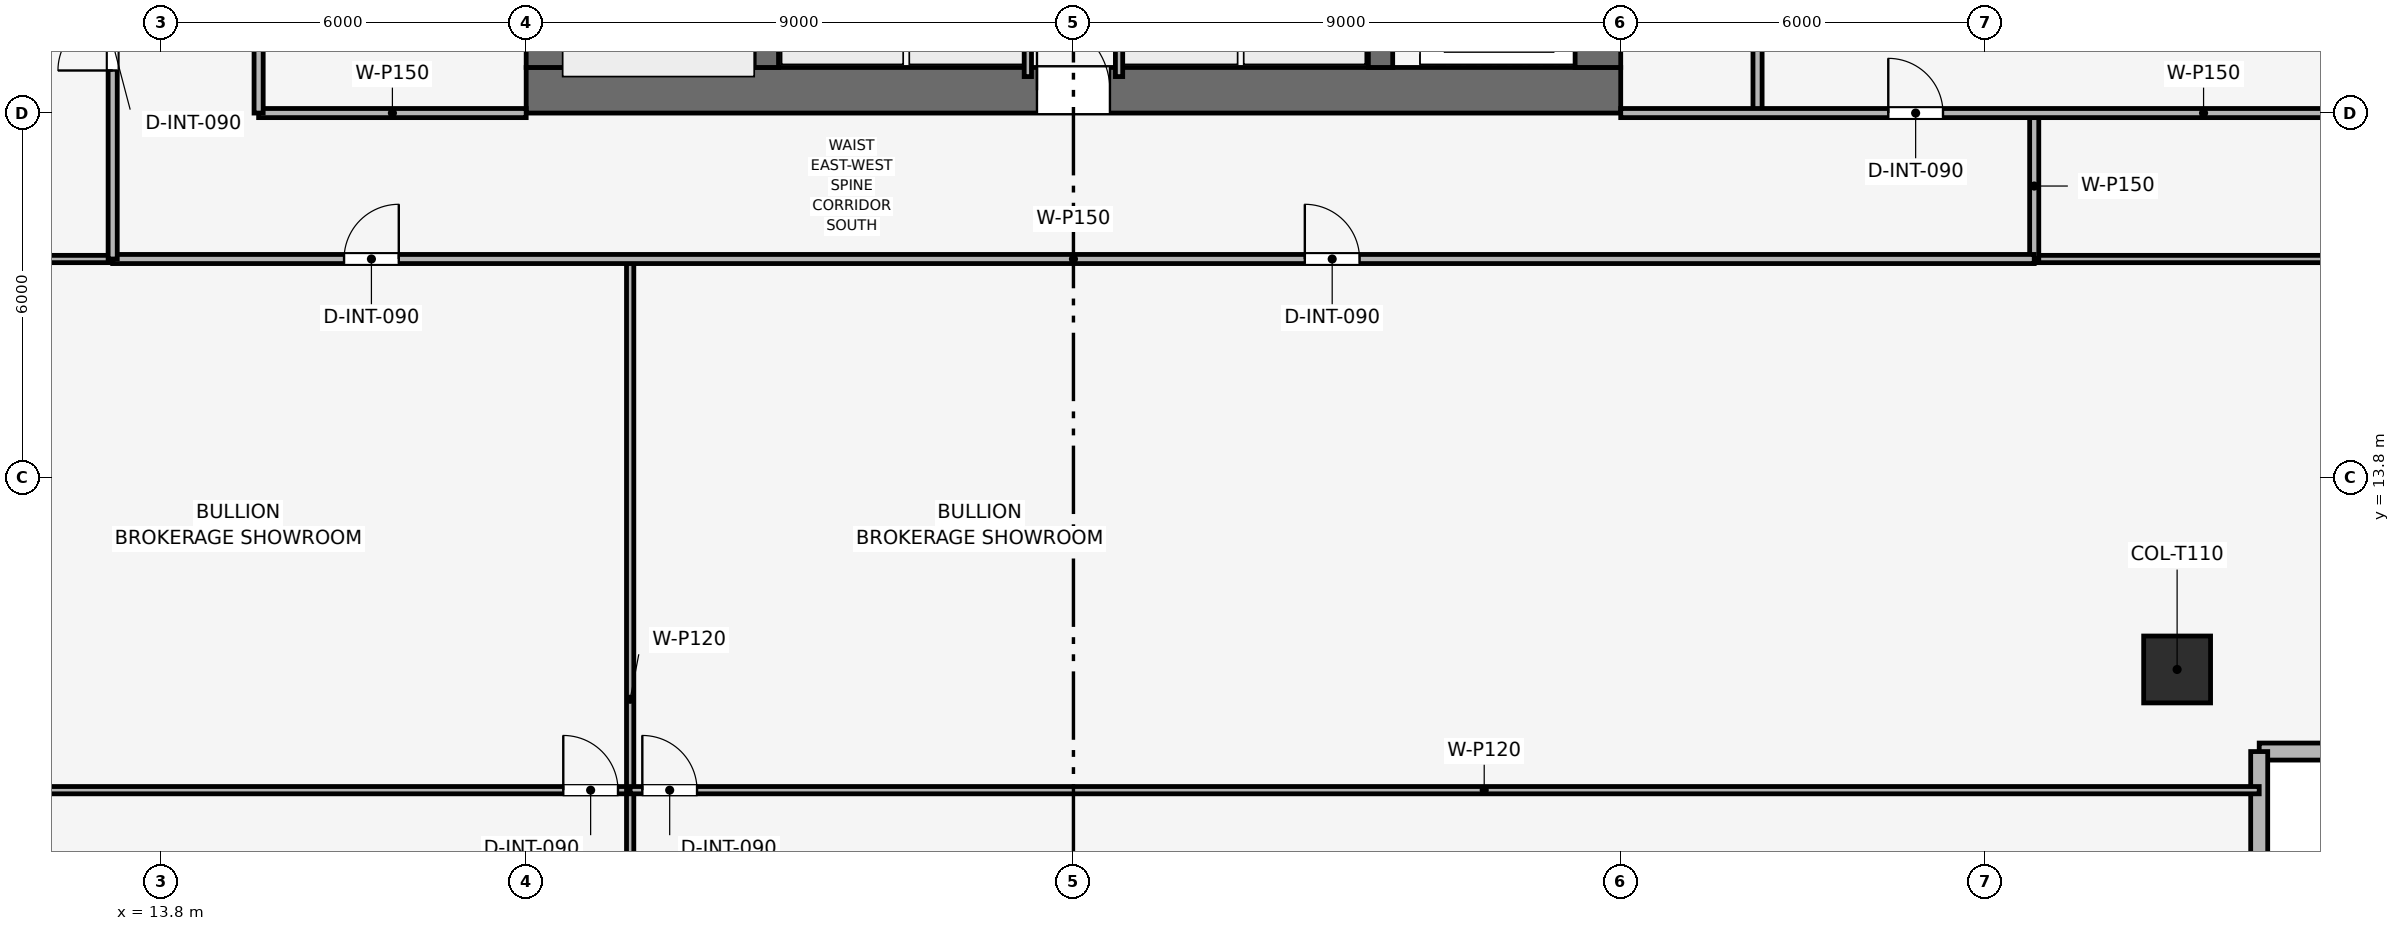
"""IFC4 building model, lengths in metres.
Left out: names, types, materials, properties, quantities, classifications, styles, units other than length and angle.
Written with IfcOpenShell. Run it as: python <this file> out.ifc"""

import sys

from ifc_helpers import new_model, si_unit, direction, frame, frame_2d, origin, origin_2d, place, context, subcontext, project, spatial, rectangle, extrude, element, fill, save


model = new_model("IFC4")
c1 = context("Model", 3, precision=1e-05, world=origin(), true_north=direction((0.0, 1.0)))
c2 = subcontext(c1, "Body", "Model", "MODEL_VIEW")
j1 = project(units=[si_unit("LENGTHUNIT", "METRE"), si_unit("PLANEANGLEUNIT", "RADIAN")], contexts=[c1])
p1 = place(None, origin())
s1 = spatial("IfcSite", under=j1, at=p1, CompositionType="ELEMENT")
p2 = place(p1, origin())
s2 = spatial("IfcBuilding", under=s1, at=p2, CompositionType="ELEMENT")
p3 = place(p2, frame((0.0, 0.0, 214.95)))
s3 = spatial("IfcBuildingStorey", under=s2, at=p3, CompositionType="ELEMENT", Elevation=214.95)
p4 = place(p3, frame((19.8, 20.175, 0.0), z_axis=(0.0, 0.0, 1.0), x_axis=(1.0, 0.0, 0.0)))
e1 = element("IfcWall", 1, at=p4, inside=s3, PredefinedType="SHEAR", context=c2, shape_type="SweptSolid", body=[
    extrude(rectangle(XDim=18.0, YDim=0.75, at=frame_2d((9.0, 0.0))), origin(), (0.0, 0.0, 1.0), 3.75),
])
p5 = place(p4, frame((8.4, 0.0, 0.0)))
e2 = element("IfcOpeningElement", 2, at=p5, cuts=e1, PredefinedType="OPENING", context=c2, shape_type="SweptSolid", body=[
    extrude(rectangle(XDim=1.2, YDim=2.2, at=frame_2d((0.6, 1.1))), frame((0.0, 0.385, 0.0), z_axis=(0.0, -1.0, 0.0), x_axis=(1.0, 0.0, 0.0)), (0.0, 0.0, 1.0), 0.77),
])
p6 = place(p3, frame((20.175, 20.55, 0.0), z_axis=(0.0, 0.0, 1.0), x_axis=(0.0, 1.0, 0.0)))
e3 = element("IfcWall", 3, at=p6, inside=s3, PredefinedType="SHEAR", context=c2, shape_type="SweptSolid", body=[
    extrude(rectangle(XDim=16.5, YDim=0.75, at=frame_2d((8.25, 0.0))), origin(), (0.0, 0.0, 1.0), 3.75),
])
p7 = place(p6, frame((10.25, 0.0, 0.0)))
e4 = element("IfcOpeningElement", 4, at=p7, cuts=e3, PredefinedType="OPENING", context=c2, shape_type="SweptSolid", body=[
    extrude(rectangle(XDim=1.1, YDim=2.15, at=frame_2d((0.55, 1.075))), frame((0.0, 0.385, 0.0), z_axis=(0.0, -1.0, 0.0), x_axis=(1.0, 0.0, 0.0)), (0.0, 0.0, 1.0), 0.77),
])
p8 = place(p3, frame((37.425, 20.55, 0.0), z_axis=(0.0, 0.0, 1.0), x_axis=(0.0, 1.0, 0.0)))
e5 = element("IfcWall", 5, at=p8, inside=s3, PredefinedType="SHEAR", context=c2, shape_type="SweptSolid", body=[
    extrude(rectangle(XDim=16.5, YDim=0.75, at=frame_2d((8.25, 0.0))), origin(), (0.0, 0.0, 1.0), 3.75),
])
p9 = place(p8, frame((4.75, 0.0, 0.0)))
e6 = element("IfcOpeningElement", 6, at=p9, cuts=e5, PredefinedType="OPENING", context=c2, shape_type="SweptSolid", body=[
    extrude(rectangle(XDim=1.1, YDim=2.15, at=frame_2d((0.55, 1.075))), frame((0.0, 0.385, 0.0), z_axis=(0.0, -1.0, 0.0), x_axis=(1.0, 0.0, 0.0)), (0.0, 0.0, 1.0), 0.77),
])
for number, where, z_axis, x_axis in (
    (7, (23.75, 20.55, 0.0), (0.0, 0.0, 1.0), (0.0, 1.0, 0.0)),
    (8, (33.85, 20.55, 0.0), (0.0, 0.0, 1.0), (0.0, 1.0, 0.0)),
):
    element("IfcWall", number, at=place(p3, frame(where, z_axis=z_axis, x_axis=x_axis)), inside=s3, PredefinedType="SHEAR", context=c2, shape_type="SweptSolid", body=[
        extrude(rectangle(XDim=16.5, YDim=0.4, at=frame_2d((8.25, 0.0))), origin(), (0.0, 0.0, 1.0), 3.75),
    ])
p10 = place(p3, frame((46.95, 10.65, 0.003), z_axis=(0.0, 0.0, 1.0), x_axis=(1.0, 0.0, 0.0)))
e9 = element("IfcColumn", 9, at=p10, inside=s3, PredefinedType="COLUMN", context=c2, shape_type="SweptSolid", body=[
    extrude(rectangle(XDim=1.1, YDim=1.1, at=origin_2d()), origin(), (0.0, 0.0, 1.0), 3.494),
])
p11 = place(p3, frame((55.67, 9.3, 0.0), z_axis=(0.0, 0.0, 1.0), x_axis=(-1.0, 0.0, 0.0)))
e10 = element("IfcWall", 10, at=p11, inside=s3, PredefinedType="SOLIDWALL", context=c2, shape_type="SweptSolid", body=[
    extrude(rectangle(XDim=7.37, YDim=0.28, at=frame_2d((3.685, 0.0))), origin(), (0.0, 0.0, 1.0), 3.5),
])
p12 = place(p11, frame((2.435, 0.0, 0.9)))
e11 = element("IfcOpeningElement", 11, at=p12, cuts=e10, PredefinedType="OPENING", context=c2, shape_type="SweptSolid", body=[
    extrude(rectangle(XDim=2.5, YDim=1.9, at=frame_2d((1.25, 0.95))), frame((0.0, 0.15, 0.0), z_axis=(0.0, -1.0, 0.0), x_axis=(1.0, 0.0, 0.0)), (0.0, 0.0, 1.0), 0.3),
])
p13 = place(p3, frame((48.3, 9.3, 0.0), z_axis=(0.0, 0.0, 1.0), x_axis=(0.0, -1.0, 0.0)))
e12 = element("IfcWall", 12, at=p13, inside=s3, PredefinedType="SOLIDWALL", context=c2, shape_type="SweptSolid", body=[
    extrude(rectangle(XDim=7.37, YDim=0.28, at=frame_2d((3.685, 0.0))), origin(), (0.0, 0.0, 1.0), 3.5),
])
p14 = place(p13, frame((2.435, 0.0, 0.9)))
e13 = element("IfcOpeningElement", 13, at=p14, cuts=e12, PredefinedType="OPENING", context=c2, shape_type="SweptSolid", body=[
    extrude(rectangle(XDim=2.5, YDim=1.9, at=frame_2d((1.25, 0.95))), frame((0.0, 0.15, 0.0), z_axis=(0.0, -1.0, 0.0), x_axis=(1.0, 0.0, 0.0)), (0.0, 0.0, 1.0), 0.3),
])
for number, where, z_axis, x_axis in (
    (14, (28.05, 20.4, 0.0), (0.0, 0.0, 1.0), (0.0, 1.0, 0.0)),
    (15, (29.55, 20.4, 0.0), (0.0, 0.0, 1.0), (0.0, 1.0, 0.0)),
):
    element("IfcWall", number, at=place(p3, frame(where, z_axis=z_axis, x_axis=x_axis)), inside=s3, PredefinedType="PARTITIONING", context=c2, shape_type="SweptSolid", body=[
        extrude(rectangle(XDim=2.75, YDim=0.12, at=frame_2d((1.375, 0.0))), origin(), (0.0, 0.0, 1.0), 3.5),
    ])
p15 = place(p3, frame((15.4, 19.8, 0.0), z_axis=(0.0, 0.0, 1.0), x_axis=(1.0, 0.0, 0.0)))
e16 = element("IfcWall", 16, at=p15, inside=s3, PredefinedType="PARTITIONING", context=c2, shape_type="SweptSolid", body=[
    extrude(rectangle(XDim=4.4, YDim=0.15, at=frame_2d((2.2, 0.0))), origin(), (0.0, 0.0, 1.0), 3.035),
])
p16 = place(p3, frame((15.4, 19.8, 0.0), z_axis=(0.0, 0.0, 1.0), x_axis=(0.0, 1.0, 0.0)))
e17 = element("IfcWall", 17, at=p16, inside=s3, PredefinedType="PARTITIONING", context=c2, shape_type="SweptSolid", body=[
    extrude(rectangle(XDim=10.35, YDim=0.15, at=frame_2d((5.175, 0.0))), origin(), (0.0, 0.0, 1.0), 3.035),
])
p17 = place(p16, frame((1.2, 0.0, 0.0)))
e18 = element("IfcOpeningElement", 18, at=p17, cuts=e17, PredefinedType="OPENING", context=c2, shape_type="SweptSolid", body=[
    extrude(rectangle(XDim=0.9, YDim=2.1, at=frame_2d((0.45, 1.05))), frame((0.0, 0.085, 0.0), z_axis=(0.0, -1.0, 0.0), x_axis=(1.0, 0.0, 0.0)), (0.0, 0.0, 1.0), 0.17),
])
p18 = place(p16, frame((4.7, 0.0, 0.0)))
e19 = element("IfcOpeningElement", 19, at=p18, cuts=e17, PredefinedType="OPENING", context=c2, shape_type="SweptSolid", body=[
    extrude(rectangle(XDim=0.9, YDim=2.1, at=frame_2d((0.45, 1.05))), frame((0.0, 0.085, 0.0), z_axis=(0.0, -1.0, 0.0), x_axis=(1.0, 0.0, 0.0)), (0.0, 0.0, 1.0), 0.17),
])
p19 = place(p16, frame((8.1, 0.0, 0.0)))
e20 = element("IfcOpeningElement", 20, at=p19, cuts=e17, PredefinedType="OPENING", context=c2, shape_type="SweptSolid", body=[
    extrude(rectangle(XDim=0.95, YDim=2.1, at=frame_2d((0.475, 1.05))), frame((0.0, 0.085, 0.0), z_axis=(0.0, -1.0, 0.0), x_axis=(1.0, 0.0, 0.0)), (0.0, 0.0, 1.0), 0.17),
])
p20 = place(p3, frame((40.05, 19.8, 0.0), z_axis=(0.0, 0.0, 1.0), x_axis=(0.0, 1.0, 0.0)))
e21 = element("IfcWall", 21, at=p20, inside=s3, PredefinedType="PARTITIONING", context=c2, shape_type="SweptSolid", body=[
    extrude(rectangle(XDim=7.05, YDim=0.15, at=frame_2d((3.525, 0.0))), origin(), (0.0, 0.0, 1.0), 3.035),
])
p21 = place(p3, frame((9.3, 8.665, 0.0), z_axis=(0.0, 0.0, 1.0), x_axis=(1.0, 0.0, 0.0)))
e22 = element("IfcWall", 22, at=p21, inside=s3, PredefinedType="PARTITIONING", context=c2, shape_type="SweptSolid", body=[
    extrude(rectangle(XDim=12.21, YDim=0.12, at=frame_2d((6.105, 0.0))), origin(), (0.0, 0.0, 1.0), 2.885),
])
p22 = place(p21, frame((11.11, 0.0, 0.0)))
e23 = element("IfcOpeningElement", 23, at=p22, cuts=e22, PredefinedType="OPENING", context=c2, shape_type="SweptSolid", body=[
    extrude(rectangle(XDim=0.9, YDim=2.1, at=frame_2d((0.45, 1.05))), frame((0.0, 0.07, 0.0), z_axis=(0.0, -1.0, 0.0), x_axis=(1.0, 0.0, 0.0)), (0.0, 0.0, 1.0), 0.14),
])
p23 = place(p3, frame((21.51, 1.93, 0.0), z_axis=(0.0, 0.0, 1.0), x_axis=(0.0, 1.0, 0.0)))
e24 = element("IfcWall", 24, at=p23, inside=s3, PredefinedType="PARTITIONING", context=c2, shape_type="SweptSolid", body=[
    extrude(rectangle(XDim=15.47, YDim=0.12, at=frame_2d((7.735, 0.0))), origin(), (0.0, 0.0, 1.0), 2.885),
])
p24 = place(p3, frame((21.51, 8.665, 0.0), z_axis=(0.0, 0.0, 1.0), x_axis=(1.0, 0.0, 0.0)))
e25 = element("IfcWall", 25, at=p24, inside=s3, PredefinedType="PARTITIONING", context=c2, shape_type="SweptSolid", body=[
    extrude(rectangle(XDim=26.79, YDim=0.12, at=frame_2d((13.395, 0.0))), origin(), (0.0, 0.0, 1.0), 2.885),
])
p25 = place(p24, frame((0.2, 0.0, 0.0)))
e26 = element("IfcOpeningElement", 26, at=p25, cuts=e25, PredefinedType="OPENING", context=c2, shape_type="SweptSolid", body=[
    extrude(rectangle(XDim=0.9, YDim=2.1, at=frame_2d((0.45, 1.05))), frame((0.0, 0.07, 0.0), z_axis=(0.0, -1.0, 0.0), x_axis=(1.0, 0.0, 0.0)), (0.0, 0.0, 1.0), 0.14),
])
p26 = place(p3, frame((1.93, 17.4, 0.0), z_axis=(0.0, 0.0, 1.0), x_axis=(1.0, 0.0, 0.0)))
e27 = element("IfcWall", 27, at=p26, inside=s3, PredefinedType="PARTITIONING", context=c2, shape_type="SweptSolid", body=[
    extrude(rectangle(XDim=11.07, YDim=0.12, at=frame_2d((5.535, 0.0))), origin(), (0.0, 0.0, 1.0), 2.885),
])
p27 = place(p3, frame((44.6, 17.4, 0.0), z_axis=(0.0, 0.0, 1.0), x_axis=(1.0, 0.0, 0.0)))
e28 = element("IfcWall", 28, at=p27, inside=s3, PredefinedType="PARTITIONING", context=c2, shape_type="SweptSolid", body=[
    extrude(rectangle(XDim=11.07, YDim=0.12, at=frame_2d((5.535, 0.0))), origin(), (0.0, 0.0, 1.0), 2.885),
])
p28 = place(p3, frame((44.6, 17.4, 0.0), z_axis=(0.0, 0.0, 1.0), x_axis=(0.0, 1.0, 0.0)))
e29 = element("IfcWall", 29, at=p28, inside=s3, PredefinedType="PARTITIONING", context=c2, shape_type="SweptSolid", body=[
    extrude(rectangle(XDim=2.4, YDim=0.15, at=frame_2d((1.2, 0.0))), origin(), (0.0, 0.0, 1.0), 3.5),
])
p29 = place(p3, frame((37.8, 19.8, 0.0), z_axis=(0.0, 0.0, 1.0), x_axis=(1.0, 0.0, 0.0)))
e30 = element("IfcWall", 30, at=p29, inside=s3, PredefinedType="PARTITIONING", context=c2, shape_type="SweptSolid", body=[
    extrude(rectangle(XDim=17.87, YDim=0.15, at=frame_2d((8.935, 0.0))), origin(), (0.0, 0.0, 1.0), 2.885),
])
p30 = place(p29, frame((4.4, 0.0, 0.0)))
e31 = element("IfcOpeningElement", 31, at=p30, cuts=e30, PredefinedType="OPENING", context=c2, shape_type="SweptSolid", body=[
    extrude(rectangle(XDim=0.9, YDim=2.1, at=frame_2d((0.45, 1.05))), frame((0.0, 0.085, 0.0), z_axis=(0.0, -1.0, 0.0), x_axis=(1.0, 0.0, 0.0)), (0.0, 0.0, 1.0), 0.17),
])
p31 = place(p3, frame((13.0, 17.4, 0.0), z_axis=(0.0, 0.0, 1.0), x_axis=(1.0, 0.0, 0.0)))
e32 = element("IfcWall", 32, at=p31, inside=s3, PredefinedType="PARTITIONING", context=c2, shape_type="SweptSolid", body=[
    extrude(rectangle(XDim=31.6, YDim=0.15, at=frame_2d((15.8, 0.0))), origin(), (0.0, 0.0, 1.0), 3.035),
])
p32 = place(p31, frame((3.805, 0.0, 0.0)))
e33 = element("IfcOpeningElement", 33, at=p32, cuts=e32, PredefinedType="OPENING", context=c2, shape_type="SweptSolid", body=[
    extrude(rectangle(XDim=0.9, YDim=2.1, at=frame_2d((0.45, 1.05))), frame((0.0, 0.085, 0.0), z_axis=(0.0, -1.0, 0.0), x_axis=(1.0, 0.0, 0.0)), (0.0, 0.0, 1.0), 0.17),
])
p33 = place(p31, frame((19.605, 0.0, 0.0)))
e34 = element("IfcOpeningElement", 34, at=p33, cuts=e32, PredefinedType="OPENING", context=c2, shape_type="SweptSolid", body=[
    extrude(rectangle(XDim=0.9, YDim=2.1, at=frame_2d((0.45, 1.05))), frame((0.0, 0.085, 0.0), z_axis=(0.0, -1.0, 0.0), x_axis=(1.0, 0.0, 0.0)), (0.0, 0.0, 1.0), 0.17),
])
p34 = place(p3, frame((13.0, 17.4, 0.0), z_axis=(0.0, 0.0, 1.0), x_axis=(0.0, 1.0, 0.0)))
e35 = element("IfcWall", 35, at=p34, inside=s3, PredefinedType="PARTITIONING", context=c2, shape_type="SweptSolid", body=[
    extrude(rectangle(XDim=22.8, YDim=0.15, at=frame_2d((11.4, 0.0))), origin(), (0.0, 0.0, 1.0), 3.035),
])
p35 = place(p34, frame((3.1, 0.0, 0.0)))
e36 = element("IfcOpeningElement", 36, at=p35, cuts=e35, PredefinedType="OPENING", context=c2, shape_type="SweptSolid", body=[
    extrude(rectangle(XDim=0.9, YDim=2.1, at=frame_2d((0.45, 1.05))), frame((0.0, 0.085, 0.0), z_axis=(0.0, -1.0, 0.0), x_axis=(1.0, 0.0, 0.0)), (0.0, 0.0, 1.0), 0.17),
])
p36 = place(p34, frame((6.529, 0.0, 0.0)))
e37 = element("IfcOpeningElement", 37, at=p36, cuts=e35, PredefinedType="OPENING", context=c2, shape_type="SweptSolid", body=[
    extrude(rectangle(XDim=0.9, YDim=2.1, at=frame_2d((0.45, 1.05))), frame((0.0, 0.085, 0.0), z_axis=(0.0, -1.0, 0.0), x_axis=(1.0, 0.0, 0.0)), (0.0, 0.0, 1.0), 0.17),
])
p37 = place(p34, frame((10.957, 0.0, 0.0)))
e38 = element("IfcOpeningElement", 38, at=p37, cuts=e35, PredefinedType="OPENING", context=c2, shape_type="SweptSolid", body=[
    extrude(rectangle(XDim=0.9, YDim=2.1, at=frame_2d((0.45, 1.05))), frame((0.0, 0.085, 0.0), z_axis=(0.0, -1.0, 0.0), x_axis=(1.0, 0.0, 0.0)), (0.0, 0.0, 1.0), 0.17),
])
p38 = place(p34, frame((16.527, 0.0, 0.0)))
e39 = element("IfcOpeningElement", 39, at=p38, cuts=e35, PredefinedType="OPENING", context=c2, shape_type="SweptSolid", body=[
    extrude(rectangle(XDim=0.9, YDim=2.1, at=frame_2d((0.45, 1.05))), frame((0.0, 0.085, 0.0), z_axis=(0.0, -1.0, 0.0), x_axis=(1.0, 0.0, 0.0)), (0.0, 0.0, 1.0), 0.17),
])
p39 = place(p22, origin())
e40 = element("IfcDoor", 40, at=p39, inside=s3, OperationType="SINGLE_SWING_LEFT", PredefinedType="DOOR", context=c2, shape_type="SweptSolid", body=[
    extrude(rectangle(XDim=0.9, YDim=2.1, at=frame_2d((0.45, 1.05))), frame((0.0, 0.025, 0.0), z_axis=(0.0, -1.0, 0.0), x_axis=(1.0, 0.0, 0.0)), (0.0, 0.0, 1.0), 0.05),
])
fill(e23, e40)
p40 = place(p25, origin())
e41 = element("IfcDoor", 41, at=p40, inside=s3, OperationType="SINGLE_SWING_LEFT", PredefinedType="DOOR", context=c2, shape_type="SweptSolid", body=[
    extrude(rectangle(XDim=0.9, YDim=2.1, at=frame_2d((0.45, 1.05))), frame((0.0, 0.025, 0.0), z_axis=(0.0, -1.0, 0.0), x_axis=(1.0, 0.0, 0.0)), (0.0, 0.0, 1.0), 0.05),
])
fill(e26, e41)
p41 = place(p30, origin())
e42 = element("IfcDoor", 42, at=p41, inside=s3, OperationType="SINGLE_SWING_LEFT", PredefinedType="DOOR", context=c2, shape_type="SweptSolid", body=[
    extrude(rectangle(XDim=0.9, YDim=2.1, at=frame_2d((0.45, 1.05))), frame((0.0, 0.025, 0.0), z_axis=(0.0, -1.0, 0.0), x_axis=(1.0, 0.0, 0.0)), (0.0, 0.0, 1.0), 0.05),
])
fill(e31, e42)
p42 = place(p32, origin())
e43 = element("IfcDoor", 43, at=p42, inside=s3, OperationType="SINGLE_SWING_RIGHT", PredefinedType="DOOR", context=c2, shape_type="SweptSolid", body=[
    extrude(rectangle(XDim=0.9, YDim=2.1, at=frame_2d((0.45, 1.05))), frame((0.0, 0.025, 0.0), z_axis=(0.0, -1.0, 0.0), x_axis=(1.0, 0.0, 0.0)), (0.0, 0.0, 1.0), 0.05),
])
fill(e33, e43)
p43 = place(p33, origin())
e44 = element("IfcDoor", 44, at=p43, inside=s3, OperationType="SINGLE_SWING_LEFT", PredefinedType="DOOR", context=c2, shape_type="SweptSolid", body=[
    extrude(rectangle(XDim=0.9, YDim=2.1, at=frame_2d((0.45, 1.05))), frame((0.0, 0.025, 0.0), z_axis=(0.0, -1.0, 0.0), x_axis=(1.0, 0.0, 0.0)), (0.0, 0.0, 1.0), 0.05),
])
fill(e34, e44)
p44 = place(p35, origin())
e45 = element("IfcDoor", 45, at=p44, inside=s3, OperationType="SINGLE_SWING_LEFT", PredefinedType="DOOR", context=c2, shape_type="SweptSolid", body=[
    extrude(rectangle(XDim=0.9, YDim=2.1, at=frame_2d((0.45, 1.05))), frame((0.0, 0.025, 0.0), z_axis=(0.0, -1.0, 0.0), x_axis=(1.0, 0.0, 0.0)), (0.0, 0.0, 1.0), 0.05),
])
fill(e36, e45)
p45 = place(p5, origin())
e46 = element("IfcDoor", 46, at=p45, inside=s3, OperationType="SINGLE_SWING_LEFT", PredefinedType="DOOR", context=c2, shape_type="SweptSolid", body=[
    extrude(rectangle(XDim=1.2, YDim=2.2, at=frame_2d((0.6, 1.1))), frame((0.0, 0.025, 0.0), z_axis=(0.0, -1.0, 0.0), x_axis=(1.0, 0.0, 0.0)), (0.0, 0.0, 1.0), 0.05),
])
fill(e2, e46)
save(model, sys.argv[1])
